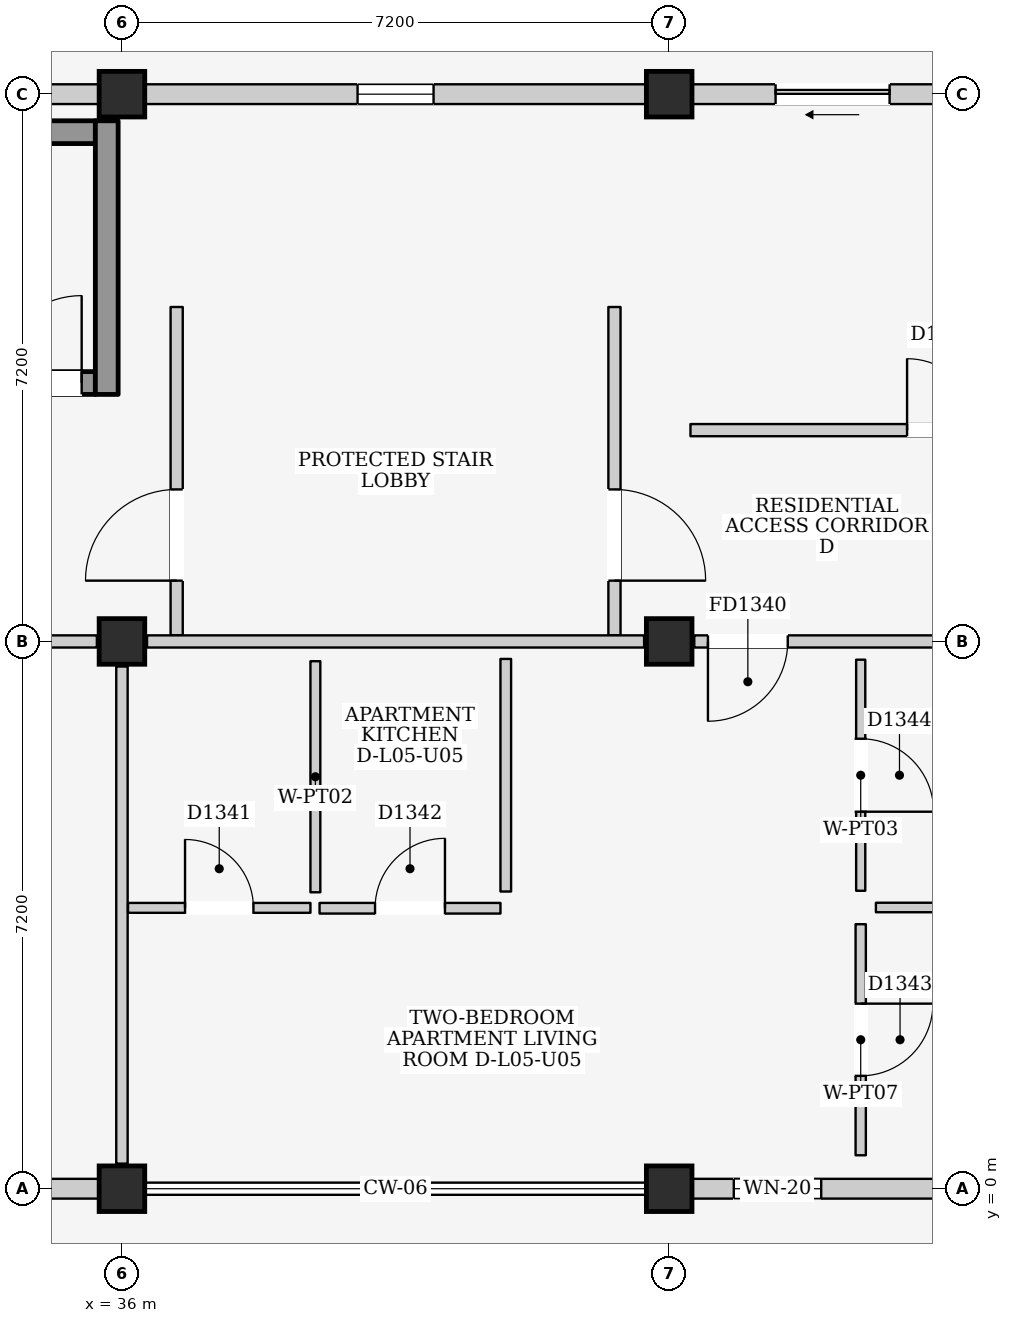
"""IFC4 building model, lengths in metres.
Left out: names, types, materials, properties, quantities, classifications, styles, units other than length and angle.
Written with IfcOpenShell. Run it as: python <this file> out.ifc"""

import sys

from ifc_helpers import new_model, si_unit, direction, frame, frame_2d, origin, origin_2d, place, context, subcontext, project, spatial, rectangle, extrude, element, fill, save


model = new_model("IFC4")
c1 = context("Model", 3, precision=1e-05, world=origin(), true_north=direction((0.0, 1.0)))
c2 = subcontext(c1, "Body", "Model", "MODEL_VIEW")
j1 = project(units=[si_unit("LENGTHUNIT", "METRE"), si_unit("PLANEANGLEUNIT", "RADIAN")], contexts=[c1])
p1 = place(None, origin())
s1 = spatial("IfcSite", under=j1, at=p1, CompositionType="ELEMENT")
p2 = place(p1, origin())
s2 = spatial("IfcBuilding", under=s1, at=p2, CompositionType="ELEMENT")
p3 = place(p2, frame((0.0, 0.0, 18.6)))
s3 = spatial("IfcBuildingStorey", under=s2, at=p3, CompositionType="ELEMENT", Elevation=18.6)
for number, where, z_axis, x_axis in (
    (1, (36.0, 0.0, 0.0), (0.0, 0.0, 1.0), (1.0, 0.0, 0.0)),
    (2, (36.0, 7.2, 0.0), (0.0, 0.0, 1.0), (1.0, 0.0, 0.0)),
    (3, (36.0, 14.4, 0.0), (0.0, 0.0, 1.0), (1.0, 0.0, 0.0)),
    (4, (43.2, 0.0, 0.0), (0.0, 0.0, 1.0), (1.0, 0.0, 0.0)),
    (5, (43.2, 7.2, 0.0), (0.0, 0.0, 1.0), (1.0, 0.0, 0.0)),
    (6, (43.2, 14.4, 0.0), (0.0, 0.0, 1.0), (1.0, 0.0, 0.0)),
):
    element("IfcColumn", number, at=place(p3, frame(where, z_axis=z_axis, x_axis=x_axis)), inside=s3, PredefinedType="COLUMN", context=c2, shape_type="SweptSolid", body=[
        extrude(rectangle(XDim=0.6, YDim=0.6, at=origin_2d()), origin(), (0.0, 0.0, 1.0), 3.3),
    ])
p4 = place(p3, frame((29.1, 0.0, 0.0), z_axis=(0.0, 0.0, 1.0), x_axis=(1.0, 0.0, 0.0)))
e7 = element("IfcWall", 7, at=p4, inside=s3, PredefinedType="ELEMENTEDWALL", context=c2, shape_type="SweptSolid", body=[
    extrude(rectangle(XDim=6.6, YDim=0.26, at=frame_2d((3.3, 0.0))), origin(), (0.0, 0.0, 1.0), 2.595),
])
p5 = place(p4, frame((3.85, 0.0, 0.0)))
e8 = element("IfcOpeningElement", 8, at=p5, cuts=e7, PredefinedType="OPENING", context=c2, shape_type="SweptSolid", body=[
    extrude(rectangle(XDim=2.0, YDim=2.12, at=frame_2d((1.0, 1.06))), frame((0.0, 0.145, 0.0), z_axis=(0.0, -1.0, 0.0), x_axis=(1.0, 0.0, 0.0)), (0.0, 0.0, 1.0), 0.29),
])
p6 = place(p4, frame((0.55, 0.0, 0.9)))
e9 = element("IfcOpeningElement", 9, at=p6, cuts=e7, PredefinedType="OPENING", context=c2, shape_type="SweptSolid", body=[
    extrude(rectangle(XDim=1.95, YDim=1.55, at=frame_2d((0.975, 0.775))), frame((0.0, 0.145, 0.0), z_axis=(0.0, -1.0, 0.0), x_axis=(1.0, 0.0, 0.0)), (0.0, 0.0, 1.0), 0.29),
])
p7 = place(p3, frame((29.1, 14.4, 0.0), z_axis=(0.0, 0.0, 1.0), x_axis=(1.0, 0.0, 0.0)))
e10 = element("IfcWall", 10, at=p7, inside=s3, PredefinedType="ELEMENTEDWALL", context=c2, shape_type="SweptSolid", body=[
    extrude(rectangle(XDim=6.6, YDim=0.26, at=frame_2d((3.3, 0.0))), origin(), (0.0, 0.0, 1.0), 2.445),
])
p8 = place(p7, frame((2.8, 0.0, 1.2)))
e11 = element("IfcOpeningElement", 11, at=p8, cuts=e10, PredefinedType="OPENING", context=c2, shape_type="SweptSolid", body=[
    extrude(rectangle(XDim=1.0, YDim=0.9, at=frame_2d((0.5, 0.45))), frame((0.0, 0.145, 0.0), z_axis=(0.0, -1.0, 0.0), x_axis=(1.0, 0.0, 0.0)), (0.0, 0.0, 1.0), 0.29),
])
p9 = place(p3, frame((36.3, 14.4, 0.0), z_axis=(0.0, 0.0, 1.0), x_axis=(1.0, 0.0, 0.0)))
e12 = element("IfcWall", 12, at=p9, inside=s3, PredefinedType="ELEMENTEDWALL", context=c2, shape_type="SweptSolid", body=[
    extrude(rectangle(XDim=6.6, YDim=0.26, at=frame_2d((3.3, 0.0))), origin(), (0.0, 0.0, 1.0), 2.445),
])
p10 = place(p9, frame((2.8, 0.0, 1.2)))
e13 = element("IfcOpeningElement", 13, at=p10, cuts=e12, PredefinedType="OPENING", context=c2, shape_type="SweptSolid", body=[
    extrude(rectangle(XDim=1.0, YDim=0.9, at=frame_2d((0.5, 0.45))), frame((0.0, 0.145, 0.0), z_axis=(0.0, -1.0, 0.0), x_axis=(1.0, 0.0, 0.0)), (0.0, 0.0, 1.0), 0.29),
])
p11 = place(p3, frame((43.5, 0.0, 0.0), z_axis=(0.0, 0.0, 1.0), x_axis=(1.0, 0.0, 0.0)))
e14 = element("IfcWall", 14, at=p11, inside=s3, PredefinedType="ELEMENTEDWALL", context=c2, shape_type="SweptSolid", body=[
    extrude(rectangle(XDim=6.6, YDim=0.26, at=frame_2d((3.3, 0.0))), origin(), (0.0, 0.0, 1.0), 2.595),
])
p12 = place(p11, frame((3.85, 0.0, 0.0)))
e15 = element("IfcOpeningElement", 15, at=p12, cuts=e14, PredefinedType="OPENING", context=c2, shape_type="SweptSolid", body=[
    extrude(rectangle(XDim=1.8, YDim=2.12, at=frame_2d((0.9, 1.06))), frame((0.0, 0.145, 0.0), z_axis=(0.0, -1.0, 0.0), x_axis=(1.0, 0.0, 0.0)), (0.0, 0.0, 1.0), 0.29),
])
p13 = place(p11, frame((0.55, 0.0, 0.9)))
e16 = element("IfcOpeningElement", 16, at=p13, cuts=e14, PredefinedType="OPENING", context=c2, shape_type="SweptSolid", body=[
    extrude(rectangle(XDim=1.15, YDim=1.15, at=frame_2d((0.575, 0.575))), frame((0.0, 0.145, 0.0), z_axis=(0.0, -1.0, 0.0), x_axis=(1.0, 0.0, 0.0)), (0.0, 0.0, 1.0), 0.29),
])
p14 = place(p3, frame((43.5, 14.4, 0.0), z_axis=(0.0, 0.0, 1.0), x_axis=(1.0, 0.0, 0.0)))
e17 = element("IfcWall", 17, at=p14, inside=s3, PredefinedType="ELEMENTEDWALL", context=c2, shape_type="SweptSolid", body=[
    extrude(rectangle(XDim=6.6, YDim=0.26, at=frame_2d((3.3, 0.0))), origin(), (0.0, 0.0, 1.0), 2.445),
])
p15 = place(p14, frame((1.1, 0.0, 0.0)))
e18 = element("IfcOpeningElement", 18, at=p15, cuts=e17, PredefinedType="OPENING", context=c2, shape_type="SweptSolid", body=[
    extrude(rectangle(XDim=1.5, YDim=2.12, at=frame_2d((0.75, 1.06))), frame((0.0, 0.145, 0.0), z_axis=(0.0, -1.0, 0.0), x_axis=(1.0, 0.0, 0.0)), (0.0, 0.0, 1.0), 0.29),
])
p16 = place(p14, frame((3.6, 0.0, 0.835)))
e19 = element("IfcOpeningElement", 19, at=p16, cuts=e17, PredefinedType="OPENING", context=c2, shape_type="SweptSolid", body=[
    extrude(rectangle(XDim=1.35, YDim=1.5, at=frame_2d((0.675, 0.75))), frame((0.0, 0.145, 0.0), z_axis=(0.0, -1.0, 0.0), x_axis=(1.0, 0.0, 0.0)), (0.0, 0.0, 1.0), 0.29),
])
p17 = place(p3, frame((29.15, 10.6, 0.0), z_axis=(0.0, 0.0, 1.0), x_axis=(1.0, 0.0, 0.0)))
e20 = element("IfcWall", 20, at=p17, inside=s3, PredefinedType="SHEAR", context=c2, shape_type="SweptSolid", body=[
    extrude(rectangle(XDim=6.5, YDim=0.3, at=frame_2d((3.25, 0.0))), origin(), (0.0, 0.0, 1.0), 3.06),
])
p18 = place(p17, frame((5.17, 0.0, 0.0)))
e21 = element("IfcOpeningElement", 21, at=p18, cuts=e20, PredefinedType="OPENING", context=c2, shape_type="SweptSolid", body=[
    extrude(rectangle(XDim=1.15, YDim=2.2, at=frame_2d((0.575, 1.1))), frame((0.0, 0.165, 0.0), z_axis=(0.0, -1.0, 0.0), x_axis=(1.0, 0.0, 0.0)), (0.0, 0.0, 1.0), 0.33),
])
p19 = place(p3, frame((29.15, 13.9, 0.0), z_axis=(0.0, 0.0, 1.0), x_axis=(1.0, 0.0, 0.0)))
e22 = element("IfcWall", 22, at=p19, inside=s3, PredefinedType="SHEAR", context=c2, shape_type="SweptSolid", body=[
    extrude(rectangle(XDim=6.5, YDim=0.3, at=frame_2d((3.25, 0.0))), origin(), (0.0, 0.0, 1.0), 3.06),
])
p20 = place(p3, frame((35.8, 10.45, 0.0), z_axis=(0.0, 0.0, 1.0), x_axis=(0.0, 1.0, 0.0)))
e23 = element("IfcWall", 23, at=p20, inside=s3, PredefinedType="SHEAR", context=c2, shape_type="SweptSolid", body=[
    extrude(rectangle(XDim=3.6, YDim=0.3, at=frame_2d((1.8, 0.0))), origin(), (0.0, 0.0, 1.0), 3.06),
])
p21 = place(p3, frame((36.72, 7.28, 0.0), z_axis=(0.0, 0.0, 1.0), x_axis=(0.0, 1.0, 0.0)))
e24 = element("IfcWall", 24, at=p21, inside=s3, PredefinedType="PARTITIONING", context=c2, shape_type="SweptSolid", body=[
    extrude(rectangle(XDim=4.32, YDim=0.16, at=frame_2d((2.16, 0.0))), origin(), (0.0, 0.0, 1.0), 3.06),
])
p22 = place(p21, frame((0.72, 0.0, 0.0)))
e25 = element("IfcOpeningElement", 25, at=p22, cuts=e24, PredefinedType="OPENING", context=c2, shape_type="SweptSolid", body=[
    extrude(rectangle(XDim=1.2, YDim=2.2, at=frame_2d((0.6, 1.1))), frame((0.0, 0.095, 0.0), z_axis=(0.0, -1.0, 0.0), x_axis=(1.0, 0.0, 0.0)), (0.0, 0.0, 1.0), 0.19),
])
p23 = place(p3, frame((42.48, 7.28, 0.0), z_axis=(0.0, 0.0, 1.0), x_axis=(0.0, 1.0, 0.0)))
e26 = element("IfcWall", 26, at=p23, inside=s3, PredefinedType="PARTITIONING", context=c2, shape_type="SweptSolid", body=[
    extrude(rectangle(XDim=4.32, YDim=0.16, at=frame_2d((2.16, 0.0))), origin(), (0.0, 0.0, 1.0), 3.06),
])
p24 = place(p23, frame((0.72, 0.0, 0.0)))
e27 = element("IfcOpeningElement", 27, at=p24, cuts=e26, PredefinedType="OPENING", context=c2, shape_type="SweptSolid", body=[
    extrude(rectangle(XDim=1.2, YDim=2.2, at=frame_2d((0.6, 1.1))), frame((0.0, 0.095, 0.0), z_axis=(0.0, -1.0, 0.0), x_axis=(1.0, 0.0, 0.0)), (0.0, 0.0, 1.0), 0.19),
])
p25 = place(p3, frame((29.13, 7.2, 0.0), z_axis=(0.0, 0.0, 1.0), x_axis=(1.0, 0.0, 0.0)))
e28 = element("IfcWall", 28, at=p25, inside=s3, PredefinedType="PARTITIONING", context=c2, shape_type="SweptSolid", body=[
    extrude(rectangle(XDim=6.54, YDim=0.16, at=frame_2d((3.27, 0.0))), origin(), (0.0, 0.0, 1.0), 2.445),
])
p26 = place(p25, frame((4.095, 0.0, 0.0)))
e29 = element("IfcOpeningElement", 29, at=p26, cuts=e28, PredefinedType="OPENING", context=c2, shape_type="SweptSolid", body=[
    extrude(rectangle(XDim=1.05, YDim=2.15, at=frame_2d((0.525, 1.075))), frame((0.0, 0.095, 0.0), z_axis=(0.0, -1.0, 0.0), x_axis=(1.0, 0.0, 0.0)), (0.0, 0.0, 1.0), 0.19),
])
p27 = place(p3, frame((36.0, 0.33, 0.0), z_axis=(0.0, 0.0, 1.0), x_axis=(0.0, 1.0, 0.0)))
e30 = element("IfcWall", 30, at=p27, inside=s3, PredefinedType="PARTITIONING", context=c2, shape_type="SweptSolid", body=[
    extrude(rectangle(XDim=6.54, YDim=0.15, at=frame_2d((3.27, 0.0))), origin(), (0.0, 0.0, 1.0), 2.545),
])
p28 = place(p3, frame((36.33, 7.2, 0.0), z_axis=(0.0, 0.0, 1.0), x_axis=(1.0, 0.0, 0.0)))
e31 = element("IfcWall", 31, at=p28, inside=s3, PredefinedType="PARTITIONING", context=c2, shape_type="SweptSolid", body=[
    extrude(rectangle(XDim=6.54, YDim=0.16, at=frame_2d((3.27, 0.0))), origin(), (0.0, 0.0, 1.0), 2.445),
])
p29 = place(p3, frame((43.53, 7.2, 0.0), z_axis=(0.0, 0.0, 1.0), x_axis=(1.0, 0.0, 0.0)))
e32 = element("IfcWall", 32, at=p29, inside=s3, PredefinedType="PARTITIONING", context=c2, shape_type="SweptSolid", body=[
    extrude(rectangle(XDim=6.54, YDim=0.16, at=frame_2d((3.27, 0.0))), origin(), (0.0, 0.0, 1.0), 2.445),
])
p30 = place(p29, frame((0.18, 0.0, 0.0)))
e33 = element("IfcOpeningElement", 33, at=p30, cuts=e32, PredefinedType="OPENING", context=c2, shape_type="SweptSolid", body=[
    extrude(rectangle(XDim=1.05, YDim=2.15, at=frame_2d((0.525, 1.075))), frame((0.0, 0.095, 0.0), z_axis=(0.0, -1.0, 0.0), x_axis=(1.0, 0.0, 0.0)), (0.0, 0.0, 1.0), 0.19),
])
p31 = place(p3, frame((36.08, 3.695, 0.0), z_axis=(0.0, 0.0, 1.0), x_axis=(1.0, 0.0, 0.0)))
e34 = element("IfcWall", 34, at=p31, inside=s3, PredefinedType="PARTITIONING", context=c2, shape_type="SweptSolid", body=[
    extrude(rectangle(XDim=2.4, YDim=0.13, at=frame_2d((1.2, 0.0))), origin(), (0.0, 0.0, 1.0), 3.06),
])
p32 = place(p31, frame((0.75, 0.0, 0.0)))
e35 = element("IfcOpeningElement", 35, at=p32, cuts=e34, PredefinedType="OPENING", context=c2, shape_type="SweptSolid", body=[
    extrude(rectangle(XDim=0.9, YDim=2.1, at=frame_2d((0.45, 1.05))), frame((0.0, 0.08, 0.0), z_axis=(0.0, -1.0, 0.0), x_axis=(1.0, 0.0, 0.0)), (0.0, 0.0, 1.0), 0.16),
])
p33 = place(p3, frame((38.545, 3.9, 0.0), z_axis=(0.0, 0.0, 1.0), x_axis=(0.0, 1.0, 0.0)))
e36 = element("IfcWall", 36, at=p33, inside=s3, PredefinedType="PARTITIONING", context=c2, shape_type="SweptSolid", body=[
    extrude(rectangle(XDim=3.04, YDim=0.13, at=frame_2d((1.52, 0.0))), origin(), (0.0, 0.0, 1.0), 3.06),
])
p34 = place(p3, frame((38.6, 3.69, 0.0), z_axis=(0.0, 0.0, 1.0), x_axis=(1.0, 0.0, 0.0)))
e37 = element("IfcWall", 37, at=p34, inside=s3, PredefinedType="PARTITIONING", context=c2, shape_type="SweptSolid", body=[
    extrude(rectangle(XDim=2.38, YDim=0.14, at=frame_2d((1.19, 0.0))), origin(), (0.0, 0.0, 1.0), 3.06),
])
p35 = place(p34, frame((0.73, 0.0, 0.0)))
e38 = element("IfcOpeningElement", 38, at=p35, cuts=e37, PredefinedType="OPENING", context=c2, shape_type="SweptSolid", body=[
    extrude(rectangle(XDim=0.92, YDim=2.1, at=frame_2d((0.46, 1.05))), frame((0.0, 0.085, 0.0), z_axis=(0.0, -1.0, 0.0), x_axis=(1.0, 0.0, 0.0)), (0.0, 0.0, 1.0), 0.17),
])
p36 = place(p3, frame((41.05, 3.91, 0.0), z_axis=(0.0, 0.0, 1.0), x_axis=(0.0, 1.0, 0.0)))
e39 = element("IfcWall", 39, at=p36, inside=s3, PredefinedType="PARTITIONING", context=c2, shape_type="SweptSolid", body=[
    extrude(rectangle(XDim=3.06, YDim=0.14, at=frame_2d((1.53, 0.0))), origin(), (0.0, 0.0, 1.0), 3.06),
])
p37 = place(p3, frame((45.72, 0.44, 0.0), z_axis=(0.0, 0.0, 1.0), x_axis=(0.0, 1.0, 0.0)))
e40 = element("IfcWall", 40, at=p37, inside=s3, PredefinedType="PARTITIONING", context=c2, shape_type="SweptSolid", body=[
    extrude(rectangle(XDim=3.04, YDim=0.135, at=frame_2d((1.52, 0.0))), origin(), (0.0, 0.0, 1.0), 3.06),
])
p38 = place(p37, frame((1.045, 0.0, 0.0)))
e41 = element("IfcOpeningElement", 41, at=p38, cuts=e40, PredefinedType="OPENING", context=c2, shape_type="SweptSolid", body=[
    extrude(rectangle(XDim=0.95, YDim=2.15, at=frame_2d((0.475, 1.075))), frame((0.0, 0.083, 0.0), z_axis=(0.0, -1.0, 0.0), x_axis=(1.0, 0.0, 0.0)), (0.0, 0.0, 1.0), 0.165),
])
p39 = place(p3, frame((45.92, 3.7, 0.0), z_axis=(0.0, 0.0, 1.0), x_axis=(1.0, 0.0, 0.0)))
e42 = element("IfcWall", 42, at=p39, inside=s3, PredefinedType="PARTITIONING", context=c2, shape_type="SweptSolid", body=[
    extrude(rectangle(XDim=4.06, YDim=0.125, at=frame_2d((2.03, 0.0))), origin(), (0.0, 0.0, 1.0), 3.06),
])
p40 = place(p3, frame((45.72, 3.92, 0.0), z_axis=(0.0, 0.0, 1.0), x_axis=(0.0, 1.0, 0.0)))
e43 = element("IfcWall", 43, at=p40, inside=s3, PredefinedType="PARTITIONING", context=c2, shape_type="SweptSolid", body=[
    extrude(rectangle(XDim=3.04, YDim=0.12, at=frame_2d((1.52, 0.0))), origin(), (0.0, 0.0, 1.0), 3.06),
])
p41 = place(p40, frame((1.04, 0.0, 0.0)))
e44 = element("IfcOpeningElement", 44, at=p41, cuts=e43, PredefinedType="OPENING", context=c2, shape_type="SweptSolid", body=[
    extrude(rectangle(XDim=0.96, YDim=2.15, at=frame_2d((0.48, 1.075))), frame((0.0, 0.075, 0.0), z_axis=(0.0, -1.0, 0.0), x_axis=(1.0, 0.0, 0.0)), (0.0, 0.0, 1.0), 0.15),
])
p42 = place(p3, frame((43.48, 9.98, 0.0), z_axis=(0.0, 0.0, 1.0), x_axis=(1.0, 0.0, 0.0)))
e45 = element("IfcWall", 45, at=p42, inside=s3, PredefinedType="PARTITIONING", context=c2, shape_type="SweptSolid", body=[
    extrude(rectangle(XDim=6.64, YDim=0.16, at=frame_2d((3.32, 0.0))), origin(), (0.0, 0.0, 1.0), 3.06),
])
p43 = place(p42, frame((2.85, 0.0, 0.0)))
e46 = element("IfcOpeningElement", 46, at=p43, cuts=e45, PredefinedType="OPENING", context=c2, shape_type="SweptSolid", body=[
    extrude(rectangle(XDim=0.94, YDim=2.12, at=frame_2d((0.47, 1.06))), frame((0.0, 0.095, 0.0), z_axis=(0.0, -1.0, 0.0), x_axis=(1.0, 0.0, 0.0)), (0.0, 0.0, 1.0), 0.19),
])
p44 = place(p10, origin())
e47 = element("IfcWindow", 47, at=p44, inside=s3, PartitioningType="SINGLE_PANEL", PredefinedType="WINDOW", context=c2, shape_type="SweptSolid", body=[
    extrude(rectangle(XDim=1.0, YDim=0.9, at=frame_2d((0.5, 0.45))), frame((0.0, 0.03, 0.0), z_axis=(0.0, -1.0, 0.0), x_axis=(1.0, 0.0, 0.0)), (0.0, 0.0, 1.0), 0.06),
])
fill(e13, e47)
p45 = place(p13, origin())
e48 = element("IfcWindow", 48, at=p45, inside=s3, PartitioningType="SINGLE_PANEL", PredefinedType="WINDOW", context=c2, shape_type="SweptSolid", body=[
    extrude(rectangle(XDim=1.15, YDim=1.15, at=frame_2d((0.575, 0.575))), frame((0.0, 0.03, 0.0), z_axis=(0.0, -1.0, 0.0), x_axis=(1.0, 0.0, 0.0)), (0.0, 0.0, 1.0), 0.06),
])
fill(e16, e48)
p46 = place(p15, frame((1.5, 0.0, 0.0), z_axis=(0.0, 0.0, 1.0), x_axis=(-1.0, 0.0, 0.0)))
e49 = element("IfcDoor", 49, at=p46, inside=s3, OperationType="SLIDING_TO_LEFT", PredefinedType="DOOR", context=c2, shape_type="SweptSolid", body=[
    extrude(rectangle(XDim=1.5, YDim=2.12, at=frame_2d((0.75, 1.06))), frame((0.0, 0.025, 0.0), z_axis=(0.0, -1.0, 0.0), x_axis=(1.0, 0.0, 0.0)), (0.0, 0.0, 1.0), 0.05),
])
fill(e18, e49)
p47 = place(p18, origin())
e50 = element("IfcDoor", 50, at=p47, inside=s3, OperationType="SINGLE_SWING_RIGHT", PredefinedType="DOOR", context=c2, shape_type="SweptSolid", body=[
    extrude(rectangle(XDim=1.15, YDim=2.2, at=frame_2d((0.575, 1.1))), frame((0.0, 0.025, 0.0), z_axis=(0.0, -1.0, 0.0), x_axis=(1.0, 0.0, 0.0)), (0.0, 0.0, 1.0), 0.05),
])
fill(e21, e50)
p48 = place(p22, origin())
e51 = element("IfcDoor", 51, at=p48, inside=s3, OperationType="SINGLE_SWING_LEFT", PredefinedType="DOOR", context=c2, shape_type="SweptSolid", body=[
    extrude(rectangle(XDim=1.2, YDim=2.2, at=frame_2d((0.6, 1.1))), frame((0.0, 0.025, 0.0), z_axis=(0.0, -1.0, 0.0), x_axis=(1.0, 0.0, 0.0)), (0.0, 0.0, 1.0), 0.05),
])
fill(e25, e51)
p49 = place(p24, frame((1.2, 0.0, 0.0), z_axis=(0.0, 0.0, 1.0), x_axis=(-1.0, 0.0, 0.0)))
e52 = element("IfcDoor", 52, at=p49, inside=s3, OperationType="SINGLE_SWING_RIGHT", PredefinedType="DOOR", context=c2, shape_type="SweptSolid", body=[
    extrude(rectangle(XDim=1.2, YDim=2.2, at=frame_2d((0.6, 1.1))), frame((0.0, 0.025, 0.0), z_axis=(0.0, -1.0, 0.0), x_axis=(1.0, 0.0, 0.0)), (0.0, 0.0, 1.0), 0.05),
])
fill(e27, e52)
p50 = place(p30, frame((1.05, 0.0, 0.0), z_axis=(0.0, 0.0, 1.0), x_axis=(-1.0, 0.0, 0.0)))
e53 = element("IfcDoor", 53, at=p50, inside=s3, OperationType="SINGLE_SWING_RIGHT", PredefinedType="DOOR", context=c2, shape_type="SweptSolid", body=[
    extrude(rectangle(XDim=1.05, YDim=2.15, at=frame_2d((0.525, 1.075))), frame((0.0, 0.025, 0.0), z_axis=(0.0, -1.0, 0.0), x_axis=(1.0, 0.0, 0.0)), (0.0, 0.0, 1.0), 0.05),
])
fill(e33, e53)
p51 = place(p32, origin())
e54 = element("IfcDoor", 54, at=p51, inside=s3, OperationType="SINGLE_SWING_LEFT", PredefinedType="DOOR", context=c2, shape_type="SweptSolid", body=[
    extrude(rectangle(XDim=0.9, YDim=2.1, at=frame_2d((0.45, 1.05))), frame((0.0, 0.025, 0.0), z_axis=(0.0, -1.0, 0.0), x_axis=(1.0, 0.0, 0.0)), (0.0, 0.0, 1.0), 0.05),
])
fill(e35, e54)
p52 = place(p35, origin())
e55 = element("IfcDoor", 55, at=p52, inside=s3, OperationType="SINGLE_SWING_RIGHT", PredefinedType="DOOR", context=c2, shape_type="SweptSolid", body=[
    extrude(rectangle(XDim=0.92, YDim=2.1, at=frame_2d((0.46, 1.05))), frame((0.0, 0.025, 0.0), z_axis=(0.0, -1.0, 0.0), x_axis=(1.0, 0.0, 0.0)), (0.0, 0.0, 1.0), 0.05),
])
fill(e38, e55)
p53 = place(p38, frame((0.95, 0.0, 0.0), z_axis=(0.0, 0.0, 1.0), x_axis=(-1.0, 0.0, 0.0)))
e56 = element("IfcDoor", 56, at=p53, inside=s3, OperationType="SINGLE_SWING_LEFT", PredefinedType="DOOR", context=c2, shape_type="SweptSolid", body=[
    extrude(rectangle(XDim=0.95, YDim=2.15, at=frame_2d((0.475, 1.075))), frame((0.0, 0.025, 0.0), z_axis=(0.0, -1.0, 0.0), x_axis=(1.0, 0.0, 0.0)), (0.0, 0.0, 1.0), 0.05),
])
fill(e41, e56)
p54 = place(p41, frame((0.96, 0.0, 0.0), z_axis=(0.0, 0.0, 1.0), x_axis=(-1.0, 0.0, 0.0)))
e57 = element("IfcDoor", 57, at=p54, inside=s3, OperationType="SINGLE_SWING_RIGHT", PredefinedType="DOOR", context=c2, shape_type="SweptSolid", body=[
    extrude(rectangle(XDim=0.96, YDim=2.15, at=frame_2d((0.48, 1.075))), frame((0.0, 0.025, 0.0), z_axis=(0.0, -1.0, 0.0), x_axis=(1.0, 0.0, 0.0)), (0.0, 0.0, 1.0), 0.05),
])
fill(e44, e57)
p55 = place(p43, origin())
e58 = element("IfcDoor", 58, at=p55, inside=s3, OperationType="SINGLE_SWING_LEFT", PredefinedType="DOOR", context=c2, shape_type="SweptSolid", body=[
    extrude(rectangle(XDim=0.94, YDim=2.12, at=frame_2d((0.47, 1.06))), frame((0.0, 0.025, 0.0), z_axis=(0.0, -1.0, 0.0), x_axis=(1.0, 0.0, 0.0)), (0.0, 0.0, 1.0), 0.05),
])
fill(e46, e58)
save(model, sys.argv[1])
